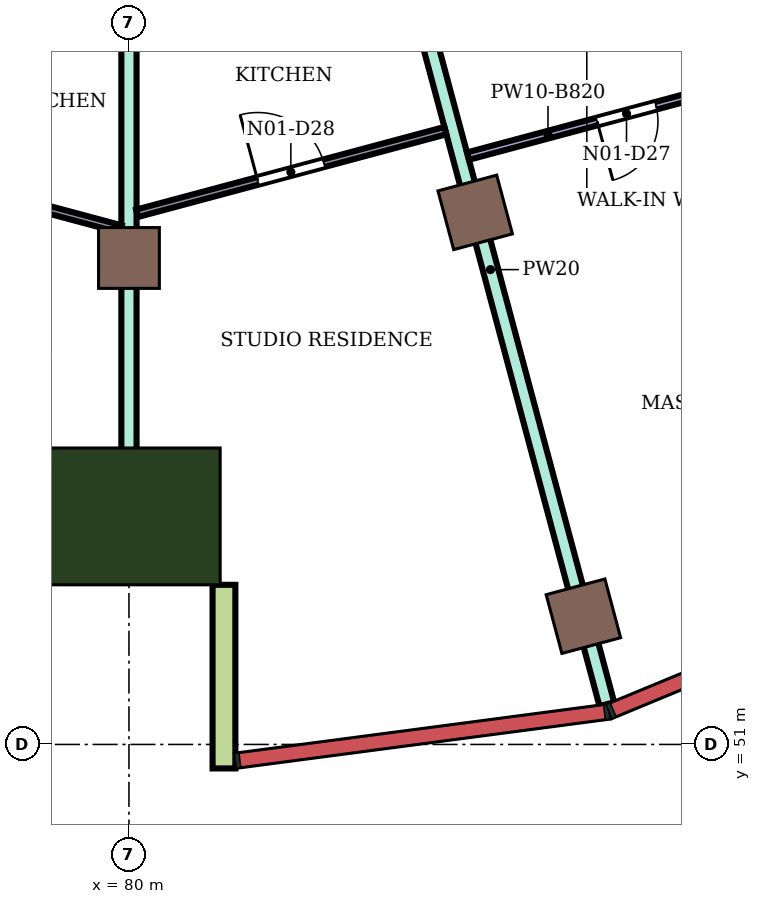
"""IFC4 building model, lengths in metres.
Left out: names, types, materials, properties, quantities, classifications, styles, units other than length and angle.
Written with IfcOpenShell. Run it as: python <this file> out.ifc"""

import sys

from ifc_helpers import new_model, si_unit, direction, frame, frame_2d, origin, origin_2d, place, context, subcontext, project, spatial, rectangle, extrude, element, fill, save


model = new_model("IFC4")
c1 = context("Model", 3, precision=1e-05, world=origin(), true_north=direction((0.0, 1.0)))
c2 = subcontext(c1, "Body", "Model", "MODEL_VIEW")
j1 = project(units=[si_unit("LENGTHUNIT", "METRE"), si_unit("PLANEANGLEUNIT", "RADIAN")], contexts=[c1])
p1 = place(None, origin())
s1 = spatial("IfcSite", under=j1, at=p1, CompositionType="ELEMENT")
p2 = place(p1, origin())
s2 = spatial("IfcBuilding", under=s1, at=p2, CompositionType="ELEMENT")
p3 = place(p2, frame((0.0, 0.0, 279.9)))
s3 = spatial("IfcBuildingStorey", under=s2, at=p3, CompositionType="ELEMENT", Elevation=279.9)
for number, where, z_axis, x_axis in (
    (1, (85.979, 52.687, 0.0), (0.0, 0.0, 1.0), (0.259, -0.966, 0.0)),
    (2, (80.0, 57.4, 0.0), (0.0, 0.0, 1.0), (0.0, -1.0, 0.0)),
    (3, (84.555, 58.0, 0.0), (0.0, 0.0, 1.0), (0.259, -0.966, 0.0)),
):
    element("IfcColumn", number, at=place(p3, frame(where, z_axis=z_axis, x_axis=x_axis)), inside=s3, PredefinedType="COLUMN", context=c2, shape_type="SweptSolid", body=[
        extrude(rectangle(XDim=0.8, YDim=0.8, at=origin_2d()), origin(), (0.0, 0.0, 1.0), 4.2),
    ])
p4 = place(p3, frame((80.0, 54.0, 0.0), z_axis=(0.0, 0.0, 1.0), x_axis=(0.0, -1.0, 0.0)))
e4 = element("IfcColumn", 4, at=p4, inside=s3, PredefinedType="COLUMN", context=c2, shape_type="SweptSolid", body=[
    extrude(rectangle(XDim=1.8, YDim=2.4, at=origin_2d()), origin(), (0.0, 0.0, 1.0), 4.2),
])
p5 = place(p3, frame((81.25, 53.1, 0.0), z_axis=(0.0, 0.0, 1.0), x_axis=(0.0, -1.0, 0.0)))
e5 = element("IfcWall", 5, at=p5, inside=s3, PredefinedType="NOTDEFINED", context=c2, shape_type="SweptSolid", body=[
    extrude(rectangle(XDim=2.416, YDim=0.3, at=frame_2d((1.208, 0.0))), origin(), (0.0, 0.0, 1.0), 4.2),
])
p6 = place(p3, frame((80.0, 53.3, 0.0), z_axis=(0.0, 0.0, 1.0), x_axis=(0.0, 1.0, 0.0)))
e6 = element("IfcWall", 6, at=p6, inside=s3, PredefinedType="PARTITIONING", context=c2, shape_type="SweptSolid", body=[
    extrude(rectangle(XDim=8.814, YDim=0.2, at=frame_2d((4.407, 0.0))), origin(), (0.0, 0.0, 1.0), 3.75),
])
p7 = place(p3, frame((83.225, 62.965, 0.0), z_axis=(0.0, 0.0, 1.0), x_axis=(0.258656021451, -0.965969493601, 0.0)))
e7 = element("IfcWall", 7, at=p7, inside=s3, PredefinedType="PARTITIONING", context=c2, shape_type="SweptSolid", body=[
    extrude(rectangle(XDim=11.838, YDim=0.2, at=frame_2d((5.919, 0.0))), origin(), (0.0, 0.0, 1.0), 3.75),
])
p8 = place(p3, frame((75.795, 58.879, 0.0), z_axis=(0.0, 0.0, 1.0), x_axis=(0.965895141847, -0.258933533857, 0.0)))
e8 = element("IfcWall", 8, at=p8, inside=s3, PredefinedType="PARTITIONING", context=c2, shape_type="SweptSolid", body=[
    extrude(rectangle(XDim=4.244, YDim=0.1, at=frame_2d((2.122, 0.0))), origin(), (0.0, 0.0, 1.0), 3.75),
])
p9 = place(p8, frame((1.672, 0.0, 0.0)))
e9 = element("IfcOpeningElement", 9, at=p9, cuts=e8, PredefinedType="OPENING", context=c2, shape_type="SweptSolid", body=[
    extrude(rectangle(XDim=0.9, YDim=2.1, at=frame_2d((0.45, 1.05))), frame((0.0, 0.06, 0.0), z_axis=(0.0, -1.0, 0.0), x_axis=(1.0, 0.0, 0.0)), (0.0, 0.0, 1.0), 0.12),
])
p10 = place(p3, frame((80.106, 57.988, 0.0), z_axis=(0.0, 0.0, 1.0), x_axis=(0.965893555682, 0.25893945063, 0.0)))
e10 = element("IfcWall", 10, at=p10, inside=s3, PredefinedType="PARTITIONING", context=c2, shape_type="SweptSolid", body=[
    extrude(rectangle(XDim=4.2, YDim=0.1, at=frame_2d((2.1, 0.0))), origin(), (0.0, 0.0, 1.0), 3.75),
])
p11 = place(p10, frame((1.645, 0.0, 0.0)))
e11 = element("IfcOpeningElement", 11, at=p11, cuts=e10, PredefinedType="OPENING", context=c2, shape_type="SweptSolid", body=[
    extrude(rectangle(XDim=0.9, YDim=2.1, at=frame_2d((0.45, 1.05))), frame((0.0, 0.06, 0.0), z_axis=(0.0, -1.0, 0.0), x_axis=(1.0, 0.0, 0.0)), (0.0, 0.0, 1.0), 0.12),
])
p12 = place(p3, frame((84.461, 58.74, 0.0), z_axis=(0.0, 0.0, 1.0), x_axis=(0.965893774063, 0.258938636026, 0.0)))
e12 = element("IfcWall", 12, at=p12, inside=s3, PredefinedType="PARTITIONING", context=c2, shape_type="SweptSolid", body=[
    extrude(rectangle(XDim=4.358, YDim=0.1, at=frame_2d((2.179, 0.0))), origin(), (0.0, 0.0, 1.0), 3.38),
])
p13 = place(p12, frame((1.759, 0.0, 0.0)))
e13 = element("IfcOpeningElement", 13, at=p13, cuts=e12, PredefinedType="OPENING", context=c2, shape_type="SweptSolid", body=[
    extrude(rectangle(XDim=0.8, YDim=2.1, at=frame_2d((0.4, 1.05))), frame((0.0, 0.06, 0.0), z_axis=(0.0, -1.0, 0.0), x_axis=(1.0, 0.0, 0.0)), (0.0, 0.0, 1.0), 0.12),
])
p14 = place(p3, frame((86.461, 63.81, 0.0), z_axis=(0.0, 0.0, 1.0), x_axis=(0.499933609462, -0.866063730986, 0.0)))
e14 = element("IfcWall", 14, at=p14, inside=s3, PredefinedType="PARTITIONING", context=c2, shape_type="SweptSolid", body=[
    extrude(rectangle(XDim=11.376, YDim=0.1, at=frame_2d((5.688, 0.0))), origin(), (0.0, 0.0, 1.0), 3.75),
])
p15 = place(p14, frame((7.47, 0.0, 0.0)))
e15 = element("IfcOpeningElement", 15, at=p15, cuts=e14, PredefinedType="OPENING", context=c2, shape_type="SweptSolid", body=[
    extrude(rectangle(XDim=0.9, YDim=2.1, at=frame_2d((0.45, 1.05))), frame((0.0, 0.06, 0.0), z_axis=(0.0, -1.0, 0.0), x_axis=(1.0, 0.0, 0.0)), (0.0, 0.0, 1.0), 0.12),
])
p16 = place(p13, frame((0.8, 0.0, 0.0), z_axis=(0.0, 0.0, 1.0), x_axis=(-1.0, 0.0, 0.0)))
e16 = element("IfcDoor", 16, at=p16, inside=s3, OperationType="SINGLE_SWING_RIGHT", PredefinedType="DOOR", context=c2, shape_type="SweptSolid", body=[
    extrude(rectangle(XDim=0.8, YDim=2.1, at=frame_2d((0.4, 1.05))), frame((0.0, 0.025, 0.0), z_axis=(0.0, -1.0, 0.0), x_axis=(1.0, 0.0, 0.0)), (0.0, 0.0, 1.0), 0.05),
])
fill(e13, e16)
p17 = place(p11, origin())
e17 = element("IfcDoor", 17, at=p17, inside=s3, OperationType="SINGLE_SWING_LEFT", PredefinedType="DOOR", context=c2, shape_type="SweptSolid", body=[
    extrude(rectangle(XDim=0.9, YDim=2.1, at=frame_2d((0.45, 1.05))), frame((0.0, 0.025, 0.0), z_axis=(0.0, -1.0, 0.0), x_axis=(1.0, 0.0, 0.0)), (0.0, 0.0, 1.0), 0.05),
])
fill(e11, e17)
save(model, sys.argv[1])
